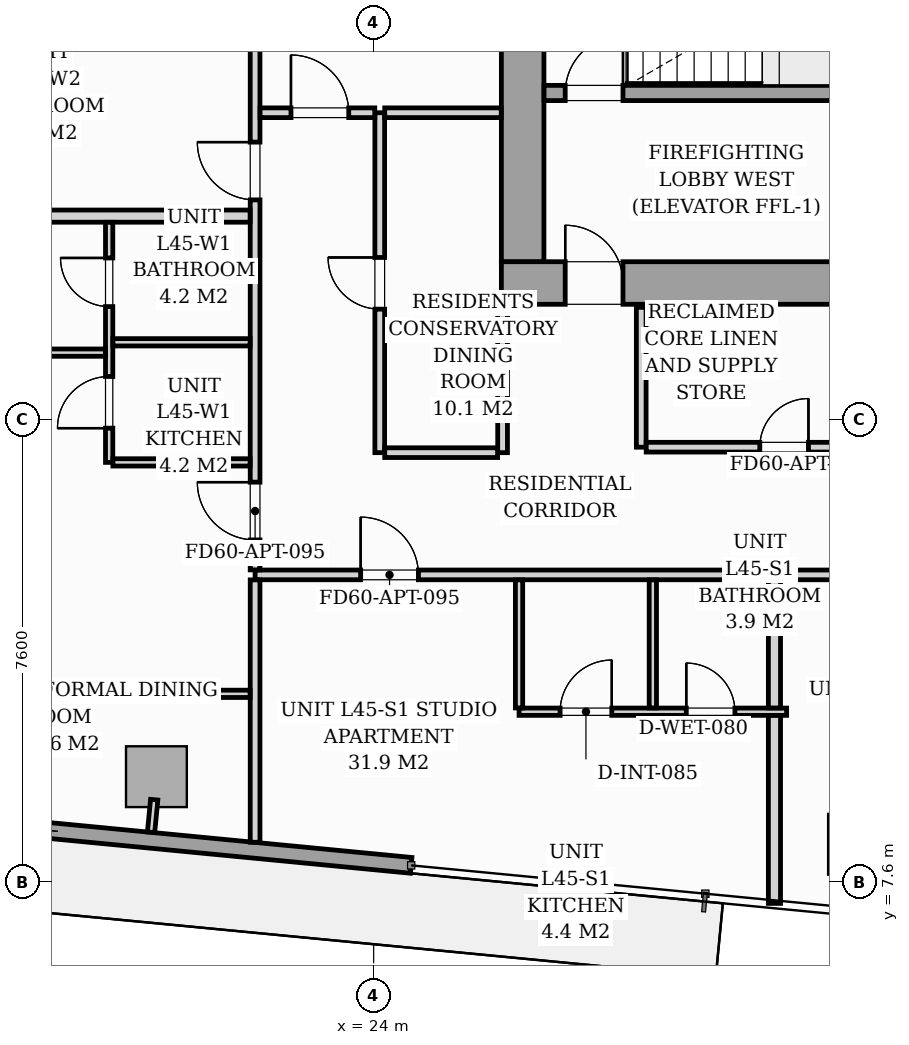
"""IFC4 building model, lengths in metres.
Left out: names, types, materials, properties, quantities, classifications, styles, units other than length and angle.
Written with IfcOpenShell. Run it as: python <this file> out.ifc"""

import sys

from ifc_helpers import new_model, si_unit, direction, frame, frame_2d, origin, origin_2d, place, context, subcontext, project, spatial, rectangle, i_section, extrude, source, transform, mapped, element, fill, save


model = new_model("IFC4")
c1 = context("Model", 3, precision=1e-05, world=origin(), true_north=direction((0.0, 1.0)))
c2 = subcontext(c1, "Body", "Model", "MODEL_VIEW")
j1 = project(units=[si_unit("LENGTHUNIT", "METRE"), si_unit("PLANEANGLEUNIT", "RADIAN")], contexts=[c1])
p1 = place(None, origin())
s1 = spatial("IfcSite", under=j1, at=p1, CompositionType="ELEMENT")
p2 = place(p1, origin())
s2 = spatial("IfcBuilding", under=s1, at=p2, CompositionType="ELEMENT")
p3 = place(p2, frame((0.0, 0.0, 156.6)))
s3 = spatial("IfcBuildingStorey", under=s2, at=p3, CompositionType="ELEMENT", Elevation=156.6)
m1 = source(origin(), c2, "Body", "SweptSolid", [
    extrude(i_section(OverallWidth=0.421, OverallDepth=0.465, WebThickness=0.045, FlangeThickness=0.073, FilletRadius=0.018, at=origin_2d()), origin(), (0.0, 0.0, 1.0), 3.196),
])
p4 = place(p3, frame((26.4, 17.4, 0.002), z_axis=(0.0, 0.0, 1.0), x_axis=(1.0, 0.0, 0.0)))
e1 = element("IfcColumn", 1, at=p4, inside=s3, PredefinedType="PILASTER", context=c2, shape_type="MappedRepresentation", body=[
    mapped(m1, transform((0.0, 0.0, 0.0), scale=1.0)),
])
m2 = source(origin(), c2, "Body", "SweptSolid", [
    extrude(rectangle(XDim=1.0, YDim=1.0, at=origin_2d()), origin(), (0.0, 0.0, 1.0), 3.196),
])
for number, where, z_axis, x_axis in (
    (2, (20.427, 9.332, 0.002), (0.0, 0.0, 1.0), (0.995, -0.096, 0.0)),
    (3, (31.974, 8.22, 0.002), (0.0, 0.0, 1.0), (0.995, -0.096, 0.0)),
):
    element("IfcColumn", number, at=place(p3, frame(where, z_axis=z_axis, x_axis=x_axis)), inside=s3, PredefinedType="COLUMN", context=c2, shape_type="MappedRepresentation", body=[
        mapped(m2, transform((0.0, 0.0, 0.0), scale=1.0)),
    ])
p5 = place(p3, frame((24.617, 7.873, 0.0), z_axis=(0.0, 0.0, 1.0), x_axis=(-0.995395976631, 0.095848055311, 0.0)))
e4 = element("IfcWall", 4, at=p5, inside=s3, PredefinedType="STANDARD", context=c2, shape_type="SweptSolid", body=[
    extrude(rectangle(XDim=17.01, YDim=0.26, at=frame_2d((8.505, 0.0))), origin(), (0.0, 0.0, 1.0), 2.94),
])
p6 = place(p5, frame((6.65, 0.0, 0.0)))
e5 = element("IfcOpeningElement", 5, at=p6, cuts=e4, PredefinedType="OPENING", context=c2, shape_type="SweptSolid", body=[
    extrude(rectangle(XDim=1.8, YDim=2.06, at=frame_2d((0.9, 1.03))), frame((0.0, 0.14, 0.0), z_axis=(0.0, -1.0, 0.0), x_axis=(1.0, 0.0, 0.0)), (0.0, 0.0, 1.0), 0.28),
])
p7 = place(p5, frame((9.25, 0.0, 0.65)))
e6 = element("IfcOpeningElement", 6, at=p7, cuts=e4, PredefinedType="OPENING", context=c2, shape_type="SweptSolid", body=[
    extrude(rectangle(XDim=1.6, YDim=1.5, at=frame_2d((0.8, 0.75))), frame((0.0, 0.14, 0.0), z_axis=(0.0, -1.0, 0.0), x_axis=(1.0, 0.0, 0.0)), (0.0, 0.0, 1.0), 0.28),
])
p8 = place(p3, frame((26.1, 17.45, 0.0), z_axis=(0.0, 0.0, 1.0), x_axis=(1.0, 0.0, 0.0)))
e7 = element("IfcWall", 7, at=p8, inside=s3, PredefinedType="SHEAR", context=c2, shape_type="SweptSolid", body=[
    extrude(rectangle(XDim=19.8, YDim=0.7, at=frame_2d((9.9, 0.0))), origin(), (0.0, 0.0, 1.0), 3.2),
])
p9 = place(p8, frame((1.05, 0.0, 0.0)))
e8 = element("IfcOpeningElement", 8, at=p9, cuts=e7, PredefinedType="OPENING", context=c2, shape_type="SweptSolid", body=[
    extrude(rectangle(XDim=0.95, YDim=2.06, at=frame_2d((0.475, 1.03))), frame((0.0, 0.36, 0.0), z_axis=(0.0, -1.0, 0.0), x_axis=(1.0, 0.0, 0.0)), (0.0, 0.0, 1.0), 0.72),
])
p10 = place(p8, frame((9.48, 0.0, 0.0)))
e9 = element("IfcOpeningElement", 9, at=p10, cuts=e7, PredefinedType="OPENING", context=c2, shape_type="SweptSolid", body=[
    extrude(rectangle(XDim=0.85, YDim=2.0, at=frame_2d((0.425, 1.0))), frame((0.0, 0.36, 0.0), z_axis=(0.0, -1.0, 0.0), x_axis=(1.0, 0.0, 0.0)), (0.0, 0.0, 1.0), 0.72),
])
p11 = place(p8, frame((17.65, 0.0, 0.0)))
e10 = element("IfcOpeningElement", 10, at=p11, cuts=e7, PredefinedType="OPENING", context=c2, shape_type="SweptSolid", body=[
    extrude(rectangle(XDim=0.95, YDim=2.06, at=frame_2d((0.475, 1.03))), frame((0.0, 0.36, 0.0), z_axis=(0.0, -1.0, 0.0), x_axis=(1.0, 0.0, 0.0)), (0.0, 0.0, 1.0), 0.72),
])
p12 = place(p3, frame((26.45, 17.802, 0.0), z_axis=(0.0, 0.0, 1.0), x_axis=(0.0, 1.0, 0.0)))
e11 = element("IfcWall", 11, at=p12, inside=s3, PredefinedType="SHEAR", context=c2, shape_type="SweptSolid", body=[
    extrude(rectangle(XDim=5.796, YDim=0.7, at=frame_2d((2.898, 0.0))), origin(), (0.0, 0.0, 1.0), 3.2),
])
p13 = place(p3, frame((26.802, 20.575, 0.0), z_axis=(0.0, 0.0, 1.0), x_axis=(1.0, 0.0, 0.0)))
e12 = element("IfcWall", 12, at=p13, inside=s3, PredefinedType="SOLIDWALL", context=c2, shape_type="SweptSolid", body=[
    extrude(rectangle(XDim=8.148, YDim=0.25, at=frame_2d((4.074, 0.0))), origin(), (0.0, 0.0, 1.0), 3.2),
])
p14 = place(p13, frame((0.348, 0.0, 0.0)))
e13 = element("IfcOpeningElement", 13, at=p14, cuts=e12, PredefinedType="OPENING", context=c2, shape_type="SweptSolid", body=[
    extrude(rectangle(XDim=0.95, YDim=2.06, at=frame_2d((0.475, 1.03))), frame((0.0, 0.135, 0.0), z_axis=(0.0, -1.0, 0.0), x_axis=(1.0, 0.0, 0.0)), (0.0, 0.0, 1.0), 0.27),
])
p15 = place(p3, frame((28.4, 14.75, 0.0), z_axis=(0.0, 0.0, 1.0), x_axis=(0.0, 1.0, 0.0)))
e14 = element("IfcWall", 14, at=p15, inside=s3, PredefinedType="PARTITIONING", context=c2, shape_type="SweptSolid", body=[
    extrude(rectangle(XDim=2.3, YDim=0.16, at=frame_2d((1.15, 0.0))), origin(), (0.0, 0.0, 1.0), 2.94),
])
p16 = place(p3, frame((28.482, 14.75, 0.0), z_axis=(0.0, 0.0, 1.0), x_axis=(1.0, 0.0, 0.0)))
e15 = element("IfcWall", 15, at=p16, inside=s3, PredefinedType="PARTITIONING", context=c2, shape_type="SweptSolid", body=[
    extrude(rectangle(XDim=4.516, YDim=0.16, at=frame_2d((2.258, 0.0))), origin(), (0.0, 0.0, 1.0), 2.94),
])
p17 = place(p16, frame((1.868, 0.0, 0.0)))
e16 = element("IfcOpeningElement", 16, at=p17, cuts=e15, PredefinedType="OPENING", context=c2, shape_type="SweptSolid", body=[
    extrude(rectangle(XDim=0.8, YDim=2.05, at=frame_2d((0.4, 1.025))), frame((0.0, 0.09, 0.0), z_axis=(0.0, -1.0, 0.0), x_axis=(1.0, 0.0, 0.0)), (0.0, 0.0, 1.0), 0.18),
])
p18 = place(p3, frame((22.05, 12.65, 0.0), z_axis=(0.0, 0.0, 1.0), x_axis=(1.0, 0.0, 0.0)))
e17 = element("IfcWall", 17, at=p18, inside=s3, PredefinedType="PARTITIONING", context=c2, shape_type="SweptSolid", body=[
    extrude(rectangle(XDim=25.65, YDim=0.16, at=frame_2d((12.825, 0.0))), origin(), (0.0, 0.0, 1.0), 2.94),
])
p19 = place(p18, frame((1.736, 0.0, 0.0)))
e18 = element("IfcOpeningElement", 18, at=p19, cuts=e17, PredefinedType="OPENING", context=c2, shape_type="SweptSolid", body=[
    extrude(rectangle(XDim=0.95, YDim=2.06, at=frame_2d((0.475, 1.03))), frame((0.0, 0.09, 0.0), z_axis=(0.0, -1.0, 0.0), x_axis=(1.0, 0.0, 0.0)), (0.0, 0.0, 1.0), 0.18),
])
p20 = place(p18, frame((10.3, 0.0, 0.0)))
e19 = element("IfcOpeningElement", 19, at=p20, cuts=e17, PredefinedType="OPENING", context=c2, shape_type="SweptSolid", body=[
    extrude(rectangle(XDim=0.95, YDim=2.06, at=frame_2d((0.475, 1.03))), frame((0.0, 0.09, 0.0), z_axis=(0.0, -1.0, 0.0), x_axis=(1.0, 0.0, 0.0)), (0.0, 0.0, 1.0), 0.18),
])
p21 = place(p18, frame((22.965, 0.0, 0.0)))
e20 = element("IfcOpeningElement", 20, at=p21, cuts=e17, PredefinedType="OPENING", context=c2, shape_type="SweptSolid", body=[
    extrude(rectangle(XDim=0.95, YDim=2.06, at=frame_2d((0.475, 1.03))), frame((0.0, 0.09, 0.0), z_axis=(0.0, -1.0, 0.0), x_axis=(1.0, 0.0, 0.0)), (0.0, 0.0, 1.0), 0.18),
])
p22 = place(p3, frame((22.05, 8.253, 0.0), z_axis=(0.0, 0.0, 1.0), x_axis=(0.0, 1.0, 0.0)))
e21 = element("IfcWall", 21, at=p22, inside=s3, PredefinedType="PARTITIONING", context=c2, shape_type="SweptSolid", body=[
    extrude(rectangle(XDim=4.315, YDim=0.16, at=frame_2d((2.157, 0.0))), origin(), (0.0, 0.0, 1.0), 2.94),
])
p23 = place(p3, frame((22.05, 12.732, 0.0), z_axis=(0.0, 0.0, 1.0), x_axis=(0.0, 1.0, 0.0)))
e22 = element("IfcWall", 22, at=p23, inside=s3, PredefinedType="PARTITIONING", context=c2, shape_type="SweptSolid", body=[
    extrude(rectangle(XDim=14.685, YDim=0.16, at=frame_2d((7.343, 0.0))), origin(), (0.0, 0.0, 1.0), 2.94),
])
p24 = place(p23, frame((0.493, 0.0, 0.0)))
e23 = element("IfcOpeningElement", 23, at=p24, cuts=e22, PredefinedType="OPENING", context=c2, shape_type="SweptSolid", body=[
    extrude(rectangle(XDim=0.95, YDim=2.06, at=frame_2d((0.475, 1.03))), frame((0.0, 0.09, 0.0), z_axis=(0.0, -1.0, 0.0), x_axis=(1.0, 0.0, 0.0)), (0.0, 0.0, 1.0), 0.18),
])
p25 = place(p23, frame((6.085, 0.0, 0.0)))
e24 = element("IfcOpeningElement", 24, at=p25, cuts=e22, PredefinedType="OPENING", context=c2, shape_type="SweptSolid", body=[
    extrude(rectangle(XDim=0.95, YDim=2.06, at=frame_2d((0.475, 1.03))), frame((0.0, 0.09, 0.0), z_axis=(0.0, -1.0, 0.0), x_axis=(1.0, 0.0, 0.0)), (0.0, 0.0, 1.0), 0.18),
])
p26 = place(p3, frame((26.391, 10.4, 0.0), z_axis=(0.0, 0.0, 1.0), x_axis=(1.0, 0.0, 0.0)))
e25 = element("IfcWall", 25, at=p26, inside=s3, PredefinedType="PARTITIONING", context=c2, shape_type="SweptSolid", body=[
    extrude(rectangle(XDim=4.4, YDim=0.12, at=frame_2d((2.2, 0.0))), origin(), (0.0, 0.0, 1.0), 2.94),
])
p27 = place(p26, frame((0.675, 0.0, 0.0)))
e26 = element("IfcOpeningElement", 26, at=p27, cuts=e25, PredefinedType="OPENING", context=c2, shape_type="SweptSolid", body=[
    extrude(rectangle(XDim=0.85, YDim=2.05, at=frame_2d((0.425, 1.025))), frame((0.0, 0.07, 0.0), z_axis=(0.0, -1.0, 0.0), x_axis=(1.0, 0.0, 0.0)), (0.0, 0.0, 1.0), 0.14),
])
p28 = place(p26, frame((2.75, 0.0, 0.0)))
e27 = element("IfcOpeningElement", 27, at=p28, cuts=e25, PredefinedType="OPENING", context=c2, shape_type="SweptSolid", body=[
    extrude(rectangle(XDim=0.8, YDim=2.02, at=frame_2d((0.4, 1.01))), frame((0.0, 0.07, 0.0), z_axis=(0.0, -1.0, 0.0), x_axis=(1.0, 0.0, 0.0)), (0.0, 0.0, 1.0), 0.14),
])
for number, where, z_axis, x_axis in (
    (28, (26.391, 10.462, 0.0), (0.0, 0.0, 1.0), (0.0, 1.0, 0.0)),
    (29, (28.591, 10.462, 0.0), (0.0, 0.0, 1.0), (0.0, 1.0, 0.0)),
):
    element("IfcWall", number, at=place(p3, frame(where, z_axis=z_axis, x_axis=x_axis)), inside=s3, PredefinedType="PARTITIONING", context=c2, shape_type="SweptSolid", body=[
        extrude(rectangle(XDim=2.106, YDim=0.12, at=frame_2d((1.053, 0.0))), origin(), (0.0, 0.0, 1.0), 2.94),
    ])
p29 = place(p3, frame((30.591, 7.248, 0.0), z_axis=(0.0, 0.0, 1.0), x_axis=(0.0, 1.0, 0.0)))
e30 = element("IfcWall", 30, at=p29, inside=s3, PredefinedType="PARTITIONING", context=c2, shape_type="SweptSolid", body=[
    extrude(rectangle(XDim=3.09, YDim=0.2, at=frame_2d((1.545, 0.0))), origin(), (0.0, 0.0, 1.0), 2.94),
])
p30 = place(p3, frame((30.591, 10.462, 0.0), z_axis=(0.0, 0.0, 1.0), x_axis=(0.0, 1.0, 0.0)))
e31 = element("IfcWall", 31, at=p30, inside=s3, PredefinedType="PARTITIONING", context=c2, shape_type="SweptSolid", body=[
    extrude(rectangle(XDim=2.106, YDim=0.2, at=frame_2d((1.053, 0.0))), origin(), (0.0, 0.0, 1.0), 2.94),
])
p31 = place(p3, frame((6.125, 18.55, 0.0), z_axis=(0.0, 0.0, 1.0), x_axis=(1.0, 0.0, 0.0)))
e32 = element("IfcWall", 32, at=p31, inside=s3, PredefinedType="PARTITIONING", context=c2, shape_type="SweptSolid", body=[
    extrude(rectangle(XDim=15.843, YDim=0.2, at=frame_2d((7.921, 0.0))), origin(), (0.0, 0.0, 1.0), 2.063),
])
p32 = place(p3, frame((19.65, 14.5, 0.0), z_axis=(0.0, 0.0, 1.0), x_axis=(0.0, 1.0, 0.0)))
e33 = element("IfcWall", 33, at=p32, inside=s3, PredefinedType="PARTITIONING", context=c2, shape_type="SweptSolid", body=[
    extrude(rectangle(XDim=3.948, YDim=0.12, at=frame_2d((1.974, 0.0))), origin(), (0.0, 0.0, 1.0), 2.94),
])
p33 = place(p32, frame((0.563, 0.0, 0.0)))
e34 = element("IfcOpeningElement", 34, at=p33, cuts=e33, PredefinedType="OPENING", context=c2, shape_type="SweptSolid", body=[
    extrude(rectangle(XDim=0.85, YDim=2.05, at=frame_2d((0.425, 1.025))), frame((0.0, 0.07, 0.0), z_axis=(0.0, -1.0, 0.0), x_axis=(1.0, 0.0, 0.0)), (0.0, 0.0, 1.0), 0.14),
])
p34 = place(p32, frame((2.562, 0.0, 0.0)))
e35 = element("IfcOpeningElement", 35, at=p34, cuts=e33, PredefinedType="OPENING", context=c2, shape_type="SweptSolid", body=[
    extrude(rectangle(XDim=0.8, YDim=2.02, at=frame_2d((0.4, 1.01))), frame((0.0, 0.07, 0.0), z_axis=(0.0, -1.0, 0.0), x_axis=(1.0, 0.0, 0.0)), (0.0, 0.0, 1.0), 0.14),
])
for number, where, z_axis, x_axis in (
    (36, (19.712, 16.475, 0.0), (0.0, 0.0, 1.0), (1.0, 0.0, 0.0)),
    (37, (19.712, 14.5, 0.0), (0.0, 0.0, 1.0), (1.0, 0.0, 0.0)),
):
    element("IfcWall", number, at=place(p3, frame(where, z_axis=z_axis, x_axis=x_axis)), inside=s3, PredefinedType="PARTITIONING", context=c2, shape_type="SweptSolid", body=[
        extrude(rectangle(XDim=2.256, YDim=0.12, at=frame_2d((1.128, 0.0))), origin(), (0.0, 0.0, 1.0), 2.94),
    ])
p35 = place(p3, frame((8.751, 10.694, 0.0), z_axis=(0.0, 0.0, 1.0), x_axis=(1.0, 0.0, 0.0)))
e38 = element("IfcWall", 38, at=p35, inside=s3, PredefinedType="PARTITIONING", context=c2, shape_type="SweptSolid", body=[
    extrude(rectangle(XDim=13.217, YDim=0.12, at=frame_2d((6.608, 0.0))), origin(), (0.0, 0.0, 1.0), 2.94),
])
p36 = place(p35, frame((6.184, 0.0, 0.0)))
e39 = element("IfcOpeningElement", 39, at=p36, cuts=e38, PredefinedType="OPENING", context=c2, shape_type="SweptSolid", body=[
    extrude(rectangle(XDim=0.85, YDim=2.05, at=frame_2d((0.425, 1.025))), frame((0.0, 0.07, 0.0), z_axis=(0.0, -1.0, 0.0), x_axis=(1.0, 0.0, 0.0)), (0.0, 0.0, 1.0), 0.14),
])
p37 = place(p3, frame((8.751, 16.305, 0.0), z_axis=(0.0, 0.0, 1.0), x_axis=(1.0, 0.0, 0.0)))
e40 = element("IfcWall", 40, at=p37, inside=s3, PredefinedType="PARTITIONING", context=c2, shape_type="SweptSolid", body=[
    extrude(rectangle(XDim=10.837, YDim=0.12, at=frame_2d((5.418, 0.0))), origin(), (0.0, 0.0, 1.0), 2.94),
])
p38 = place(p37, frame((4.993, 0.0, 0.0)))
e41 = element("IfcOpeningElement", 41, at=p38, cuts=e40, PredefinedType="OPENING", context=c2, shape_type="SweptSolid", body=[
    extrude(rectangle(XDim=0.85, YDim=2.05, at=frame_2d((0.425, 1.025))), frame((0.0, 0.07, 0.0), z_axis=(0.0, -1.0, 0.0), x_axis=(1.0, 0.0, 0.0)), (0.0, 0.0, 1.0), 0.14),
])
p39 = place(p3, frame((24.1, 14.66, 0.0), z_axis=(0.0, 0.0, 1.0), x_axis=(0.0, 1.0, 0.0)))
e42 = element("IfcWall", 42, at=p39, inside=s3, PredefinedType="PARTITIONING", context=c2, shape_type="SweptSolid", body=[
    extrude(rectangle(XDim=5.59, YDim=0.16, at=frame_2d((2.795, 0.0))), origin(), (0.0, 0.0, 1.0), 2.94),
])
p40 = place(p39, frame((2.36, 0.0, 0.0)))
e43 = element("IfcOpeningElement", 43, at=p40, cuts=e42, PredefinedType="OPENING", context=c2, shape_type="SweptSolid", body=[
    extrude(rectangle(XDim=0.85, YDim=2.0, at=frame_2d((0.425, 1.0))), frame((0.0, 0.09, 0.0), z_axis=(0.0, -1.0, 0.0), x_axis=(1.0, 0.0, 0.0)), (0.0, 0.0, 1.0), 0.18),
])
p41 = place(p3, frame((22.132, 20.25, 0.0), z_axis=(0.0, 0.0, 1.0), x_axis=(1.0, 0.0, 0.0)))
e44 = element("IfcWall", 44, at=p41, inside=s3, PredefinedType="PARTITIONING", context=c2, shape_type="SweptSolid", body=[
    extrude(rectangle(XDim=1.886, YDim=0.16, at=frame_2d((0.943, 0.0))), origin(), (0.0, 0.0, 1.0), 2.94),
])
p42 = place(p41, frame((0.508, 0.0, 0.0)))
e45 = element("IfcOpeningElement", 45, at=p42, cuts=e44, PredefinedType="OPENING", context=c2, shape_type="SweptSolid", body=[
    extrude(rectangle(XDim=0.95, YDim=2.06, at=frame_2d((0.475, 1.03))), frame((0.0, 0.09, 0.0), z_axis=(0.0, -1.0, 0.0), x_axis=(1.0, 0.0, 0.0)), (0.0, 0.0, 1.0), 0.18),
])
p43 = place(p3, frame((24.182, 20.25, 0.0), z_axis=(0.0, 0.0, 1.0), x_axis=(1.0, 0.0, 0.0)))
e46 = element("IfcWall", 46, at=p43, inside=s3, PredefinedType="PARTITIONING", context=c2, shape_type="SweptSolid", body=[
    extrude(rectangle(XDim=1.916, YDim=0.16, at=frame_2d((0.958, 0.0))), origin(), (0.0, 0.0, 1.0), 2.94),
])
p44 = place(p3, frame((26.12, 14.66, 0.0), z_axis=(0.0, 0.0, 1.0), x_axis=(0.0, 1.0, 0.0)))
e47 = element("IfcWall", 47, at=p44, inside=s3, PredefinedType="PARTITIONING", context=c2, shape_type="SweptSolid", body=[
    extrude(rectangle(XDim=2.438, YDim=0.16, at=frame_2d((1.219, 0.0))), origin(), (0.0, 0.0, 1.0), 2.94),
])
p45 = place(p3, frame((24.182, 14.66, 0.0), z_axis=(0.0, 0.0, 1.0), x_axis=(1.0, 0.0, 0.0)))
e48 = element("IfcWall", 48, at=p45, inside=s3, PredefinedType="PARTITIONING", context=c2, shape_type="SweptSolid", body=[
    extrude(rectangle(XDim=1.856, YDim=0.16, at=frame_2d((0.928, 0.0))), origin(), (0.0, 0.0, 1.0), 2.94),
])
p46 = place(p3, frame((20.391, 8.953, 0.0), z_axis=(0.0, 0.0, 1.0), x_axis=(-0.096222656154, -0.995359834654, 0.0)))
e49 = element("IfcWall", 49, at=p46, inside=s3, PredefinedType="PARTITIONING", context=c2, shape_type="SweptSolid", body=[
    extrude(rectangle(XDim=0.538, YDim=0.12, at=frame_2d((0.269, 0.0))), origin(), (0.0, 0.0, 1.0), 2.94),
])
m3 = source(origin(), c2, "Body", "SweptSolid", [
    extrude(rectangle(XDim=0.95, YDim=2.06, at=frame_2d((0.475, 1.03))), frame((0.0, 0.025, 0.0), z_axis=(0.0, -1.0, 0.0), x_axis=(1.0, 0.0, 0.0)), (0.0, 0.0, 1.0), 0.05),
])
p47 = place(p9, origin())
e50 = element("IfcDoor", 50, at=p47, inside=s3, OperationType="SINGLE_SWING_LEFT", PredefinedType="DOOR", context=c2, shape_type="MappedRepresentation", body=[
    mapped(m3, transform((0.0, 0.0, 0.0), scale=1.0)),
])
fill(e8, e50)
p48 = place(p14, origin())
e51 = element("IfcDoor", 51, at=p48, inside=s3, OperationType="SINGLE_SWING_RIGHT", PredefinedType="DOOR", context=c2, shape_type="MappedRepresentation", body=[
    mapped(m3, transform((0.0, 0.0, 0.0), scale=1.0)),
])
fill(e13, e51)
m4 = source(origin(), c2, "Body", "SweptSolid", [
    extrude(rectangle(XDim=0.8, YDim=2.05, at=frame_2d((0.4, 1.025))), frame((0.0, 0.025, 0.0), z_axis=(0.0, -1.0, 0.0), x_axis=(1.0, 0.0, 0.0)), (0.0, 0.0, 1.0), 0.05),
])
p49 = place(p17, origin())
e52 = element("IfcDoor", 52, at=p49, inside=s3, OperationType="SINGLE_SWING_RIGHT", PredefinedType="DOOR", context=c2, shape_type="MappedRepresentation", body=[
    mapped(m4, transform((0.0, 0.0, 0.0), scale=1.0)),
])
fill(e16, e52)
m5 = source(origin(), c2, "Body", "SweptSolid", [
    extrude(rectangle(XDim=0.95, YDim=2.06, at=frame_2d((0.475, 1.03))), frame((0.0, 0.025, 0.0), z_axis=(0.0, -1.0, 0.0), x_axis=(1.0, 0.0, 0.0)), (0.0, 0.0, 1.0), 0.05),
])
p50 = place(p19, origin())
e53 = element("IfcDoor", 53, at=p50, inside=s3, OperationType="SINGLE_SWING_LEFT", PredefinedType="DOOR", context=c2, shape_type="MappedRepresentation", body=[
    mapped(m5, transform((0.0, 0.0, 0.0), scale=1.0)),
])
fill(e18, e53)
m6 = source(origin(), c2, "Body", "SweptSolid", [
    extrude(rectangle(XDim=0.85, YDim=2.05, at=frame_2d((0.425, 1.025))), frame((0.0, 0.025, 0.0), z_axis=(0.0, -1.0, 0.0), x_axis=(1.0, 0.0, 0.0)), (0.0, 0.0, 1.0), 0.05),
])
p51 = place(p27, origin())
e54 = element("IfcDoor", 54, at=p51, inside=s3, OperationType="SINGLE_SWING_RIGHT", PredefinedType="DOOR", context=c2, shape_type="MappedRepresentation", body=[
    mapped(m6, transform((0.0, 0.0, 0.0), scale=1.0)),
])
fill(e26, e54)
m7 = source(origin(), c2, "Body", "SweptSolid", [
    extrude(rectangle(XDim=0.8, YDim=2.02, at=frame_2d((0.4, 1.01))), frame((0.0, 0.025, 0.0), z_axis=(0.0, -1.0, 0.0), x_axis=(1.0, 0.0, 0.0)), (0.0, 0.0, 1.0), 0.05),
])
p52 = place(p28, origin())
e55 = element("IfcDoor", 55, at=p52, inside=s3, OperationType="SINGLE_SWING_LEFT", PredefinedType="DOOR", context=c2, shape_type="MappedRepresentation", body=[
    mapped(m7, transform((0.0, 0.0, 0.0), scale=1.0)),
])
fill(e27, e55)
p53 = place(p24, origin())
e56 = element("IfcDoor", 56, at=p53, inside=s3, OperationType="SINGLE_SWING_RIGHT", PredefinedType="DOOR", context=c2, shape_type="MappedRepresentation", body=[
    mapped(m5, transform((0.0, 0.0, 0.0), scale=1.0)),
])
fill(e23, e56)
p54 = place(p33, origin())
e57 = element("IfcDoor", 57, at=p54, inside=s3, OperationType="SINGLE_SWING_LEFT", PredefinedType="DOOR", context=c2, shape_type="MappedRepresentation", body=[
    mapped(m6, transform((0.0, 0.0, 0.0), scale=1.0)),
])
fill(e34, e57)
p55 = place(p34, origin())
e58 = element("IfcDoor", 58, at=p55, inside=s3, OperationType="SINGLE_SWING_RIGHT", PredefinedType="DOOR", context=c2, shape_type="MappedRepresentation", body=[
    mapped(m7, transform((0.0, 0.0, 0.0), scale=1.0)),
])
fill(e35, e58)
p56 = place(p25, origin())
e59 = element("IfcDoor", 59, at=p56, inside=s3, OperationType="SINGLE_SWING_RIGHT", PredefinedType="DOOR", context=c2, shape_type="MappedRepresentation", body=[
    mapped(m5, transform((0.0, 0.0, 0.0), scale=1.0)),
])
fill(e24, e59)
m8 = source(origin(), c2, "Body", "SweptSolid", [
    extrude(rectangle(XDim=0.85, YDim=2.0, at=frame_2d((0.425, 1.0))), frame((0.0, 0.025, 0.0), z_axis=(0.0, -1.0, 0.0), x_axis=(1.0, 0.0, 0.0)), (0.0, 0.0, 1.0), 0.05),
])
p57 = place(p40, origin())
e60 = element("IfcDoor", 60, at=p57, inside=s3, OperationType="SINGLE_SWING_RIGHT", PredefinedType="DOOR", context=c2, shape_type="MappedRepresentation", body=[
    mapped(m8, transform((0.0, 0.0, 0.0), scale=1.0)),
])
fill(e43, e60)
p58 = place(p42, origin())
e61 = element("IfcDoor", 61, at=p58, inside=s3, OperationType="SINGLE_SWING_LEFT", PredefinedType="DOOR", context=c2, shape_type="MappedRepresentation", body=[
    mapped(m5, transform((0.0, 0.0, 0.0), scale=1.0)),
])
fill(e45, e61)
save(model, sys.argv[1])
